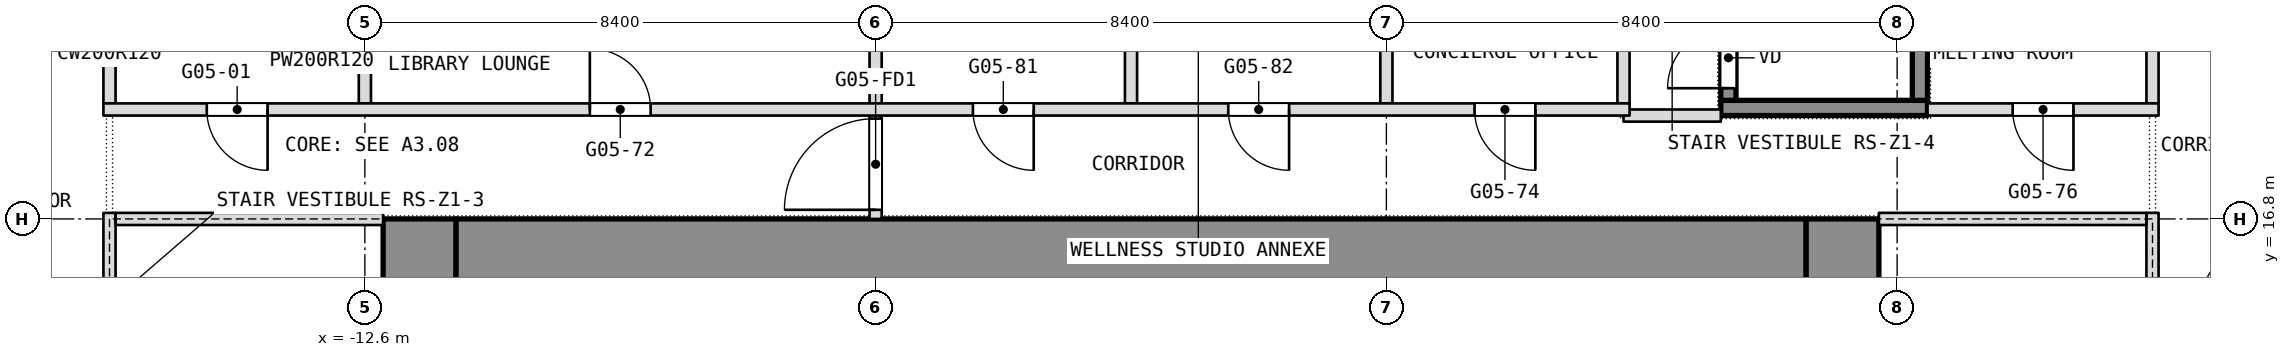
"""IFC4 building model, lengths in metres.
Left out: names, types, materials, properties, quantities, classifications, styles, units other than length and angle.
Written with IfcOpenShell. Run it as: python <this file> out.ifc"""

import sys

from ifc_helpers import new_model, si_unit, direction, frame, frame_2d, origin, place, context, subcontext, project, spatial, rectangle, extrude, element, fill, save


model = new_model("IFC4")
c1 = context("Model", 3, precision=1e-05, world=origin(), true_north=direction((0.0, 1.0)))
c2 = subcontext(c1, "Body", "Model", "MODEL_VIEW")
j1 = project(units=[si_unit("LENGTHUNIT", "METRE"), si_unit("PLANEANGLEUNIT", "RADIAN")], contexts=[c1])
p1 = place(None, origin())
s1 = spatial("IfcSite", under=j1, at=p1, CompositionType="ELEMENT")
p2 = place(p1, origin())
s2 = spatial("IfcBuilding", under=s1, at=p2, CompositionType="ELEMENT")
p3 = place(p2, frame((0.0, 0.0, 65.3)))
s3 = spatial("IfcBuildingStorey", under=s2, at=p3, CompositionType="ELEMENT", Elevation=65.3)
p4 = place(p3, frame((11.7, 0.0, 0.0), z_axis=(0.0, 0.0, 1.0), x_axis=(0.0, 1.0, 0.0)))
e1 = element("IfcWall", 1, at=p4, inside=s3, PredefinedType="SHEAR", context=c2, shape_type="SweptSolid", body=[
    extrude(rectangle(XDim=16.8, YDim=1.2, at=frame_2d((8.4, 0.0))), origin(), (0.0, 0.0, 1.0), 3.6),
])
p5 = place(p4, frame((3.6, 0.0, 0.0)))
e2 = element("IfcOpeningElement", 2, at=p5, cuts=e1, PredefinedType="OPENING", context=c2, shape_type="SweptSolid", body=[
    extrude(rectangle(XDim=0.9, YDim=2.1, at=frame_2d((0.45, 1.05))), frame((0.0, 0.6, 0.0), z_axis=(0.0, -1.0, 0.0), x_axis=(1.0, 0.0, 0.0)), (0.0, 0.0, 1.0), 1.2),
])
p6 = place(p4, frame((6.825, 0.0, 0.0)))
e3 = element("IfcOpeningElement", 3, at=p6, cuts=e1, PredefinedType="OPENING", context=c2, shape_type="SweptSolid", body=[
    extrude(rectangle(XDim=1.2, YDim=2.1, at=frame_2d((0.6, 1.05))), frame((0.0, 0.6, 0.0), z_axis=(0.0, -1.0, 0.0), x_axis=(1.0, 0.0, 0.0)), (0.0, 0.0, 1.0), 1.2),
])
p7 = place(p4, frame((14.137, 0.0, 0.0)))
e4 = element("IfcOpeningElement", 4, at=p7, cuts=e1, PredefinedType="OPENING", context=c2, shape_type="SweptSolid", body=[
    extrude(rectangle(XDim=0.9, YDim=2.1, at=frame_2d((0.45, 1.05))), frame((0.0, 0.6, 0.0), z_axis=(0.0, -1.0, 0.0), x_axis=(1.0, 0.0, 0.0)), (0.0, 0.0, 1.0), 1.2),
])
p8 = place(p4, frame((11.512, 0.0, 0.0)))
e5 = element("IfcOpeningElement", 5, at=p8, cuts=e1, PredefinedType="OPENING", context=c2, shape_type="SweptSolid", body=[
    extrude(rectangle(XDim=0.9, YDim=2.1, at=frame_2d((0.45, 1.05))), frame((0.0, 0.6, 0.0), z_axis=(0.0, -1.0, 0.0), x_axis=(1.0, 0.0, 0.0)), (0.0, 0.0, 1.0), 1.2),
])
p9 = place(p4, frame((8.775, 0.0, 0.0)))
e6 = element("IfcOpeningElement", 6, at=p9, cuts=e1, PredefinedType="OPENING", context=c2, shape_type="SweptSolid", body=[
    extrude(rectangle(XDim=1.2, YDim=2.1, at=frame_2d((0.6, 1.05))), frame((0.0, 0.6, 0.0), z_axis=(0.0, -1.0, 0.0), x_axis=(1.0, 0.0, 0.0)), (0.0, 0.0, 1.0), 1.2),
])
p10 = place(p3, frame((-11.7, 0.0, 0.0), z_axis=(0.0, 0.0, 1.0), x_axis=(0.0, 1.0, 0.0)))
e7 = element("IfcWall", 7, at=p10, inside=s3, PredefinedType="SHEAR", context=c2, shape_type="SweptSolid", body=[
    extrude(rectangle(XDim=16.8, YDim=1.2, at=frame_2d((8.4, 0.0))), origin(), (0.0, 0.0, 1.0), 3.6),
])
p11 = place(p10, frame((2.3, 0.0, 0.0)))
e8 = element("IfcOpeningElement", 8, at=p11, cuts=e7, PredefinedType="OPENING", context=c2, shape_type="SweptSolid", body=[
    extrude(rectangle(XDim=1.1, YDim=2.1, at=frame_2d((0.55, 1.05))), frame((0.0, 0.6, 0.0), z_axis=(0.0, -1.0, 0.0), x_axis=(1.0, 0.0, 0.0)), (0.0, 0.0, 1.0), 1.2),
])
p12 = place(p10, frame((4.85, 0.0, 0.0)))
e9 = element("IfcOpeningElement", 9, at=p12, cuts=e7, PredefinedType="OPENING", context=c2, shape_type="SweptSolid", body=[
    extrude(rectangle(XDim=1.1, YDim=2.1, at=frame_2d((0.55, 1.05))), frame((0.0, 0.6, 0.0), z_axis=(0.0, -1.0, 0.0), x_axis=(1.0, 0.0, 0.0)), (0.0, 0.0, 1.0), 1.2),
])
p13 = place(p10, frame((6.825, 0.0, 0.0)))
e10 = element("IfcOpeningElement", 10, at=p13, cuts=e7, PredefinedType="OPENING", context=c2, shape_type="SweptSolid", body=[
    extrude(rectangle(XDim=1.2, YDim=2.1, at=frame_2d((0.6, 1.05))), frame((0.0, 0.6, 0.0), z_axis=(0.0, -1.0, 0.0), x_axis=(1.0, 0.0, 0.0)), (0.0, 0.0, 1.0), 1.2),
])
p14 = place(p10, frame((13.4, 0.0, 0.0)))
e11 = element("IfcOpeningElement", 11, at=p14, cuts=e7, PredefinedType="OPENING", context=c2, shape_type="SweptSolid", body=[
    extrude(rectangle(XDim=1.1, YDim=2.1, at=frame_2d((0.55, 1.05))), frame((0.0, 0.6, 0.0), z_axis=(0.0, -1.0, 0.0), x_axis=(1.0, 0.0, 0.0)), (0.0, 0.0, 1.0), 1.2),
])
p15 = place(p10, frame((10.85, 0.0, 0.0)))
e12 = element("IfcOpeningElement", 12, at=p15, cuts=e7, PredefinedType="OPENING", context=c2, shape_type="SweptSolid", body=[
    extrude(rectangle(XDim=1.1, YDim=2.1, at=frame_2d((0.55, 1.05))), frame((0.0, 0.6, 0.0), z_axis=(0.0, -1.0, 0.0), x_axis=(1.0, 0.0, 0.0)), (0.0, 0.0, 1.0), 1.2),
])
p16 = place(p10, frame((8.775, 0.0, 0.0)))
e13 = element("IfcOpeningElement", 13, at=p16, cuts=e7, PredefinedType="OPENING", context=c2, shape_type="SweptSolid", body=[
    extrude(rectangle(XDim=1.2, YDim=2.1, at=frame_2d((0.6, 1.05))), frame((0.0, 0.6, 0.0), z_axis=(0.0, -1.0, 0.0), x_axis=(1.0, 0.0, 0.0)), (0.0, 0.0, 1.0), 1.2),
])
p17 = place(p3, frame((-11.1, 16.2, 0.0), z_axis=(0.0, 0.0, 1.0), x_axis=(1.0, 0.0, 0.0)))
e14 = element("IfcWall", 14, at=p17, inside=s3, PredefinedType="SHEAR", context=c2, shape_type="SweptSolid", body=[
    extrude(rectangle(XDim=22.2, YDim=1.2, at=frame_2d((11.1, 0.0))), origin(), (0.0, 0.0, 1.0), 3.6),
])
p18 = place(p3, frame((16.8, 18.7, 0.0), z_axis=(0.0, 0.0, 1.0), x_axis=(0.0, 1.0, 0.0)))
e15 = element("IfcWall", 15, at=p18, inside=s3, PredefinedType="PARTITIONING", context=c2, shape_type="SweptSolid", body=[
    extrude(rectangle(XDim=3.0, YDim=0.2, at=frame_2d((1.5, 0.0))), origin(), (0.0, 0.0, 1.0), 3.34),
])
for number, where, z_axis, x_axis in (
    (16, (8.1, 18.7, 0.0), (0.0, 0.0, 1.0), (0.0, 1.0, 0.0)),
    (17, (4.2, 18.7, 0.0), (0.0, 0.0, 1.0), (0.0, 1.0, 0.0)),
    (18, (0.0, 18.7, 0.0), (0.0, 0.0, 1.0), (0.0, 1.0, 0.0)),
):
    element("IfcWall", number, at=place(p3, frame(where, z_axis=z_axis, x_axis=x_axis)), inside=s3, PredefinedType="PARTITIONING", context=c2, shape_type="SweptSolid", body=[
        extrude(rectangle(XDim=2.8, YDim=0.2, at=frame_2d((1.4, 0.0))), origin(), (0.0, 0.0, 1.0), 3.34),
    ])
p19 = place(p3, frame((-4.2, 16.8, 0.0), z_axis=(0.0, 0.0, 1.0), x_axis=(0.0, 1.0, 0.0)))
e19 = element("IfcWall", 19, at=p19, inside=s3, PredefinedType="PARTITIONING", context=c2, shape_type="SweptSolid", body=[
    extrude(rectangle(XDim=6.7, YDim=0.2, at=frame_2d((3.35, 0.0))), origin(), (0.0, 0.0, 1.0), 3.34),
])
p20 = place(p19, frame((0.15, 0.0, 0.0)))
e20 = element("IfcOpeningElement", 20, at=p20, cuts=e19, PredefinedType="OPENING", context=c2, shape_type="SweptSolid", body=[
    extrude(rectangle(XDim=1.5, YDim=2.1, at=frame_2d((0.75, 1.05))), frame((0.0, 0.1, 0.0), z_axis=(0.0, -1.0, 0.0), x_axis=(1.0, 0.0, 0.0)), (0.0, 0.0, 1.0), 0.2),
])
p21 = place(p19, frame((4.95, 0.0, 0.0)))
e21 = element("IfcOpeningElement", 21, at=p21, cuts=e19, PredefinedType="OPENING", context=c2, shape_type="SweptSolid", body=[
    extrude(rectangle(XDim=1.5, YDim=2.1, at=frame_2d((0.75, 1.05))), frame((0.0, 0.1, 0.0), z_axis=(0.0, -1.0, 0.0), x_axis=(1.0, 0.0, 0.0)), (0.0, 0.0, 1.0), 0.2),
])
p22 = place(p3, frame((-12.6, 18.7, 0.0), z_axis=(0.0, 0.0, 1.0), x_axis=(0.0, 1.0, 0.0)))
e22 = element("IfcWall", 22, at=p22, inside=s3, PredefinedType="PARTITIONING", context=c2, shape_type="SweptSolid", body=[
    extrude(rectangle(XDim=2.8, YDim=0.2, at=frame_2d((1.4, 0.0))), origin(), (0.0, 0.0, 1.0), 3.34),
])
p23 = place(p3, frame((-16.8, 18.7, 0.0), z_axis=(0.0, 0.0, 1.0), x_axis=(0.0, 1.0, 0.0)))
e23 = element("IfcWall", 23, at=p23, inside=s3, PredefinedType="PARTITIONING", context=c2, shape_type="SweptSolid", body=[
    extrude(rectangle(XDim=3.0, YDim=0.2, at=frame_2d((1.5, 0.0))), origin(), (0.0, 0.0, 1.0), 3.34),
])
p24 = place(p3, frame((8.1, 18.5, 0.0), z_axis=(0.0, 0.0, 1.0), x_axis=(1.0, 0.0, 0.0)))
e24 = element("IfcWall", 24, at=p24, inside=s3, PredefinedType="PARTITIONING", context=c2, shape_type="SweptSolid", body=[
    extrude(rectangle(XDim=1.6, YDim=0.2, at=frame_2d((0.8, 0.0))), origin(), (0.0, 0.0, 1.0), 3.34),
])
p25 = place(p3, frame((-16.9, 18.6, 0.0), z_axis=(0.0, 0.0, 1.0), x_axis=(1.0, 0.0, 0.0)))
e25 = element("IfcWall", 25, at=p25, inside=s3, PredefinedType="PARTITIONING", context=c2, shape_type="SweptSolid", body=[
    extrude(rectangle(XDim=25.1, YDim=0.2, at=frame_2d((12.55, 0.0))), origin(), (0.0, 0.0, 1.0), 3.34),
])
p26 = place(p25, frame((1.7, 0.0, 0.0)))
e26 = element("IfcOpeningElement", 26, at=p26, cuts=e25, PredefinedType="OPENING", context=c2, shape_type="SweptSolid", body=[
    extrude(rectangle(XDim=1.0, YDim=2.1, at=frame_2d((0.5, 1.05))), frame((0.0, 0.1, 0.0), z_axis=(0.0, -1.0, 0.0), x_axis=(1.0, 0.0, 0.0)), (0.0, 0.0, 1.0), 0.2),
])
p27 = place(p25, frame((8.0, 0.0, 0.0)))
e27 = element("IfcOpeningElement", 27, at=p27, cuts=e25, PredefinedType="OPENING", context=c2, shape_type="SweptSolid", body=[
    extrude(rectangle(XDim=1.0, YDim=2.1, at=frame_2d((0.5, 1.05))), frame((0.0, 0.1, 0.0), z_axis=(0.0, -1.0, 0.0), x_axis=(1.0, 0.0, 0.0)), (0.0, 0.0, 1.0), 0.2),
])
p28 = place(p25, frame((22.55, 0.0, 0.0)))
e28 = element("IfcOpeningElement", 28, at=p28, cuts=e25, PredefinedType="OPENING", context=c2, shape_type="SweptSolid", body=[
    extrude(rectangle(XDim=1.0, YDim=2.1, at=frame_2d((0.5, 1.05))), frame((0.0, 0.1, 0.0), z_axis=(0.0, -1.0, 0.0), x_axis=(1.0, 0.0, 0.0)), (0.0, 0.0, 1.0), 0.2),
])
p29 = place(p25, frame((14.3, 0.0, 0.0)))
e29 = element("IfcOpeningElement", 29, at=p29, cuts=e25, PredefinedType="OPENING", context=c2, shape_type="SweptSolid", body=[
    extrude(rectangle(XDim=1.0, YDim=2.1, at=frame_2d((0.5, 1.05))), frame((0.0, 0.1, 0.0), z_axis=(0.0, -1.0, 0.0), x_axis=(1.0, 0.0, 0.0)), (0.0, 0.0, 1.0), 0.2),
])
p30 = place(p25, frame((18.5, 0.0, 0.0)))
e30 = element("IfcOpeningElement", 30, at=p30, cuts=e25, PredefinedType="OPENING", context=c2, shape_type="SweptSolid", body=[
    extrude(rectangle(XDim=1.0, YDim=2.1, at=frame_2d((0.5, 1.05))), frame((0.0, 0.1, 0.0), z_axis=(0.0, -1.0, 0.0), x_axis=(1.0, 0.0, 0.0)), (0.0, 0.0, 1.0), 0.2),
])
p31 = place(p3, frame((13.1, 18.6, 0.0), z_axis=(0.0, 0.0, 1.0), x_axis=(1.0, 0.0, 0.0)))
e31 = element("IfcWall", 31, at=p31, inside=s3, PredefinedType="PARTITIONING", context=c2, shape_type="SweptSolid", body=[
    extrude(rectangle(XDim=3.8, YDim=0.2, at=frame_2d((1.9, 0.0))), origin(), (0.0, 0.0, 1.0), 3.34),
])
p32 = place(p31, frame((1.4, 0.0, 0.0)))
e32 = element("IfcOpeningElement", 32, at=p32, cuts=e31, PredefinedType="OPENING", context=c2, shape_type="SweptSolid", body=[
    extrude(rectangle(XDim=1.0, YDim=2.1, at=frame_2d((0.5, 1.05))), frame((0.0, 0.1, 0.0), z_axis=(0.0, -1.0, 0.0), x_axis=(1.0, 0.0, 0.0)), (0.0, 0.0, 1.0), 0.2),
])
p33 = place(p3, frame((-16.8, -0.1, 0.0), z_axis=(0.0, 0.0, 1.0), x_axis=(0.0, 1.0, 0.0)))
e33 = element("IfcWall", 33, at=p33, inside=s3, PredefinedType="PARTITIONING", context=c2, shape_type="SweptSolid", body=[
    extrude(rectangle(XDim=17.0, YDim=0.2, at=frame_2d((8.5, 0.0))), origin(), (0.0, 0.0, 1.0), 3.34),
])
p34 = place(p33, frame((2.2, 0.0, 0.0)))
e34 = element("IfcOpeningElement", 34, at=p34, cuts=e33, PredefinedType="OPENING", context=c2, shape_type="SweptSolid", body=[
    extrude(rectangle(XDim=1.8, YDim=2.1, at=frame_2d((0.9, 1.05))), frame((0.0, 0.1, 0.0), z_axis=(0.0, -1.0, 0.0), x_axis=(1.0, 0.0, 0.0)), (0.0, 0.0, 1.0), 0.2),
])
p35 = place(p33, frame((7.2, 0.0, 0.0)))
e35 = element("IfcOpeningElement", 35, at=p35, cuts=e33, PredefinedType="OPENING", context=c2, shape_type="SweptSolid", body=[
    extrude(rectangle(XDim=1.8, YDim=2.1, at=frame_2d((0.9, 1.05))), frame((0.0, 0.1, 0.0), z_axis=(0.0, -1.0, 0.0), x_axis=(1.0, 0.0, 0.0)), (0.0, 0.0, 1.0), 0.2),
])
p36 = place(p3, frame((-16.7, 16.8, 0.0), z_axis=(0.0, 0.0, 1.0), x_axis=(1.0, 0.0, 0.0)))
e36 = element("IfcWall", 36, at=p36, inside=s3, PredefinedType="PARTITIONING", context=c2, shape_type="SweptSolid", body=[
    extrude(rectangle(XDim=4.4, YDim=0.2, at=frame_2d((2.2, 0.0))), origin(), (0.0, 0.0, 1.0), 2.84),
])
p37 = place(p3, frame((16.8, -0.1, 0.0), z_axis=(0.0, 0.0, 1.0), x_axis=(0.0, 1.0, 0.0)))
e37 = element("IfcWall", 37, at=p37, inside=s3, PredefinedType="PARTITIONING", context=c2, shape_type="SweptSolid", body=[
    extrude(rectangle(XDim=17.0, YDim=0.2, at=frame_2d((8.5, 0.0))), origin(), (0.0, 0.0, 1.0), 3.34),
])
p38 = place(p37, frame((2.2, 0.0, 0.0)))
e38 = element("IfcOpeningElement", 38, at=p38, cuts=e37, PredefinedType="OPENING", context=c2, shape_type="SweptSolid", body=[
    extrude(rectangle(XDim=1.8, YDim=2.1, at=frame_2d((0.9, 1.05))), frame((0.0, 0.1, 0.0), z_axis=(0.0, -1.0, 0.0), x_axis=(1.0, 0.0, 0.0)), (0.0, 0.0, 1.0), 0.2),
])
p39 = place(p37, frame((13.0, 0.0, 0.0)))
e39 = element("IfcOpeningElement", 39, at=p39, cuts=e37, PredefinedType="OPENING", context=c2, shape_type="SweptSolid", body=[
    extrude(rectangle(XDim=1.8, YDim=2.1, at=frame_2d((0.9, 1.05))), frame((0.0, 0.1, 0.0), z_axis=(0.0, -1.0, 0.0), x_axis=(1.0, 0.0, 0.0)), (0.0, 0.0, 1.0), 0.2),
])
p40 = place(p3, frame((12.3, 16.8, 0.0), z_axis=(0.0, 0.0, 1.0), x_axis=(1.0, 0.0, 0.0)))
e40 = element("IfcWall", 40, at=p40, inside=s3, PredefinedType="PARTITIONING", context=c2, shape_type="SweptSolid", body=[
    extrude(rectangle(XDim=4.4, YDim=0.2, at=frame_2d((2.2, 0.0))), origin(), (0.0, 0.0, 1.0), 2.84),
])
p41 = place(p3, frame((9.7, 18.625, 0.1), z_axis=(0.0, 0.0, 1.0), x_axis=(1.0, 0.0, 0.0)))
e41 = element("IfcWall", 41, at=p41, inside=s3, PredefinedType="SHEAR", context=c2, shape_type="SweptSolid", body=[
    extrude(rectangle(XDim=3.4, YDim=0.25, at=frame_2d((1.7, 0.0))), origin(), (0.0, 0.0, 1.0), 3.6),
])
p42 = place(p3, frame((9.825, 18.75, 0.1), z_axis=(0.0, 0.0, 1.0), x_axis=(0.0, 1.0, 0.0)))
e42 = element("IfcWall", 42, at=p42, inside=s3, PredefinedType="SHEAR", context=c2, shape_type="SweptSolid", body=[
    extrude(rectangle(XDim=5.7, YDim=0.25, at=frame_2d((2.85, 0.0))), origin(), (0.0, 0.0, 1.0), 3.6),
])
p43 = place(p42, frame((0.2, 0.0, 0.0)))
e43 = element("IfcOpeningElement", 43, at=p43, cuts=e42, PredefinedType="OPENING", context=c2, shape_type="SweptSolid", body=[
    extrude(rectangle(XDim=1.0, YDim=2.1, at=frame_2d((0.5, 1.05))), frame((0.0, 0.125, 0.0), z_axis=(0.0, -1.0, 0.0), x_axis=(1.0, 0.0, 0.0)), (0.0, 0.0, 1.0), 0.25),
])
p44 = place(p3, frame((12.975, 18.75, 0.1), z_axis=(0.0, 0.0, 1.0), x_axis=(0.0, 1.0, 0.0)))
e44 = element("IfcWall", 44, at=p44, inside=s3, PredefinedType="SHEAR", context=c2, shape_type="SweptSolid", body=[
    extrude(rectangle(XDim=5.7, YDim=0.25, at=frame_2d((2.85, 0.0))), origin(), (0.0, 0.0, 1.0), 3.6),
])
p45 = place(p26, origin())
e45 = element("IfcDoor", 45, at=p45, inside=s3, OperationType="SINGLE_SWING_RIGHT", PredefinedType="DOOR", context=c2, shape_type="SweptSolid", body=[
    extrude(rectangle(XDim=1.0, YDim=2.1, at=frame_2d((0.5, 1.05))), frame((0.0, 0.025, 0.0), z_axis=(0.0, -1.0, 0.0), x_axis=(1.0, 0.0, 0.0)), (0.0, 0.0, 1.0), 0.05),
])
fill(e26, e45)
p46 = place(p27, origin())
e46 = element("IfcDoor", 46, at=p46, inside=s3, OperationType="SINGLE_SWING_RIGHT", PredefinedType="DOOR", context=c2, shape_type="SweptSolid", body=[
    extrude(rectangle(XDim=1.0, YDim=2.1, at=frame_2d((0.5, 1.05))), frame((0.0, 0.025, 0.0), z_axis=(0.0, -1.0, 0.0), x_axis=(1.0, 0.0, 0.0)), (0.0, 0.0, 1.0), 0.05),
])
fill(e27, e46)
p47 = place(p28, origin())
e47 = element("IfcDoor", 47, at=p47, inside=s3, OperationType="SINGLE_SWING_RIGHT", PredefinedType="DOOR", context=c2, shape_type="SweptSolid", body=[
    extrude(rectangle(XDim=1.0, YDim=2.1, at=frame_2d((0.5, 1.05))), frame((0.0, 0.025, 0.0), z_axis=(0.0, -1.0, 0.0), x_axis=(1.0, 0.0, 0.0)), (0.0, 0.0, 1.0), 0.05),
])
fill(e28, e47)
p48 = place(p29, origin())
e48 = element("IfcDoor", 48, at=p48, inside=s3, OperationType="SINGLE_SWING_LEFT", PredefinedType="DOOR", context=c2, shape_type="SweptSolid", body=[
    extrude(rectangle(XDim=1.0, YDim=2.1, at=frame_2d((0.5, 1.05))), frame((0.0, 0.025, 0.0), z_axis=(0.0, -1.0, 0.0), x_axis=(1.0, 0.0, 0.0)), (0.0, 0.0, 1.0), 0.05),
])
fill(e29, e48)
p49 = place(p30, origin())
e49 = element("IfcDoor", 49, at=p49, inside=s3, OperationType="SINGLE_SWING_RIGHT", PredefinedType="DOOR", context=c2, shape_type="SweptSolid", body=[
    extrude(rectangle(XDim=1.0, YDim=2.1, at=frame_2d((0.5, 1.05))), frame((0.0, 0.025, 0.0), z_axis=(0.0, -1.0, 0.0), x_axis=(1.0, 0.0, 0.0)), (0.0, 0.0, 1.0), 0.05),
])
fill(e30, e49)
p50 = place(p32, origin())
e50 = element("IfcDoor", 50, at=p50, inside=s3, OperationType="SINGLE_SWING_LEFT", PredefinedType="DOOR", context=c2, shape_type="SweptSolid", body=[
    extrude(rectangle(XDim=1.0, YDim=2.1, at=frame_2d((0.5, 1.05))), frame((0.0, 0.025, 0.0), z_axis=(0.0, -1.0, 0.0), x_axis=(1.0, 0.0, 0.0)), (0.0, 0.0, 1.0), 0.05),
])
fill(e32, e50)
p51 = place(p43, origin())
e51 = element("IfcDoor", 51, at=p51, inside=s3, OperationType="SINGLE_SWING_LEFT", PredefinedType="DOOR", context=c2, shape_type="SweptSolid", body=[
    extrude(rectangle(XDim=1.0, YDim=2.1, at=frame_2d((0.5, 1.05))), frame((0.0, 0.025, 0.0), z_axis=(0.0, -1.0, 0.0), x_axis=(1.0, 0.0, 0.0)), (0.0, 0.0, 1.0), 0.05),
])
fill(e43, e51)
p52 = place(p20, origin())
e52 = element("IfcDoor", 52, at=p52, inside=s3, OperationType="DOUBLE_DOOR_DOUBLE_SWING", PredefinedType="DOOR", context=c2, shape_type="SweptSolid", body=[
    extrude(rectangle(XDim=1.5, YDim=2.1, at=frame_2d((0.75, 1.05))), frame((0.0, 0.025, 0.0), z_axis=(0.0, -1.0, 0.0), x_axis=(1.0, 0.0, 0.0)), (0.0, 0.0, 1.0), 0.05),
])
fill(e20, e52)
save(model, sys.argv[1])
